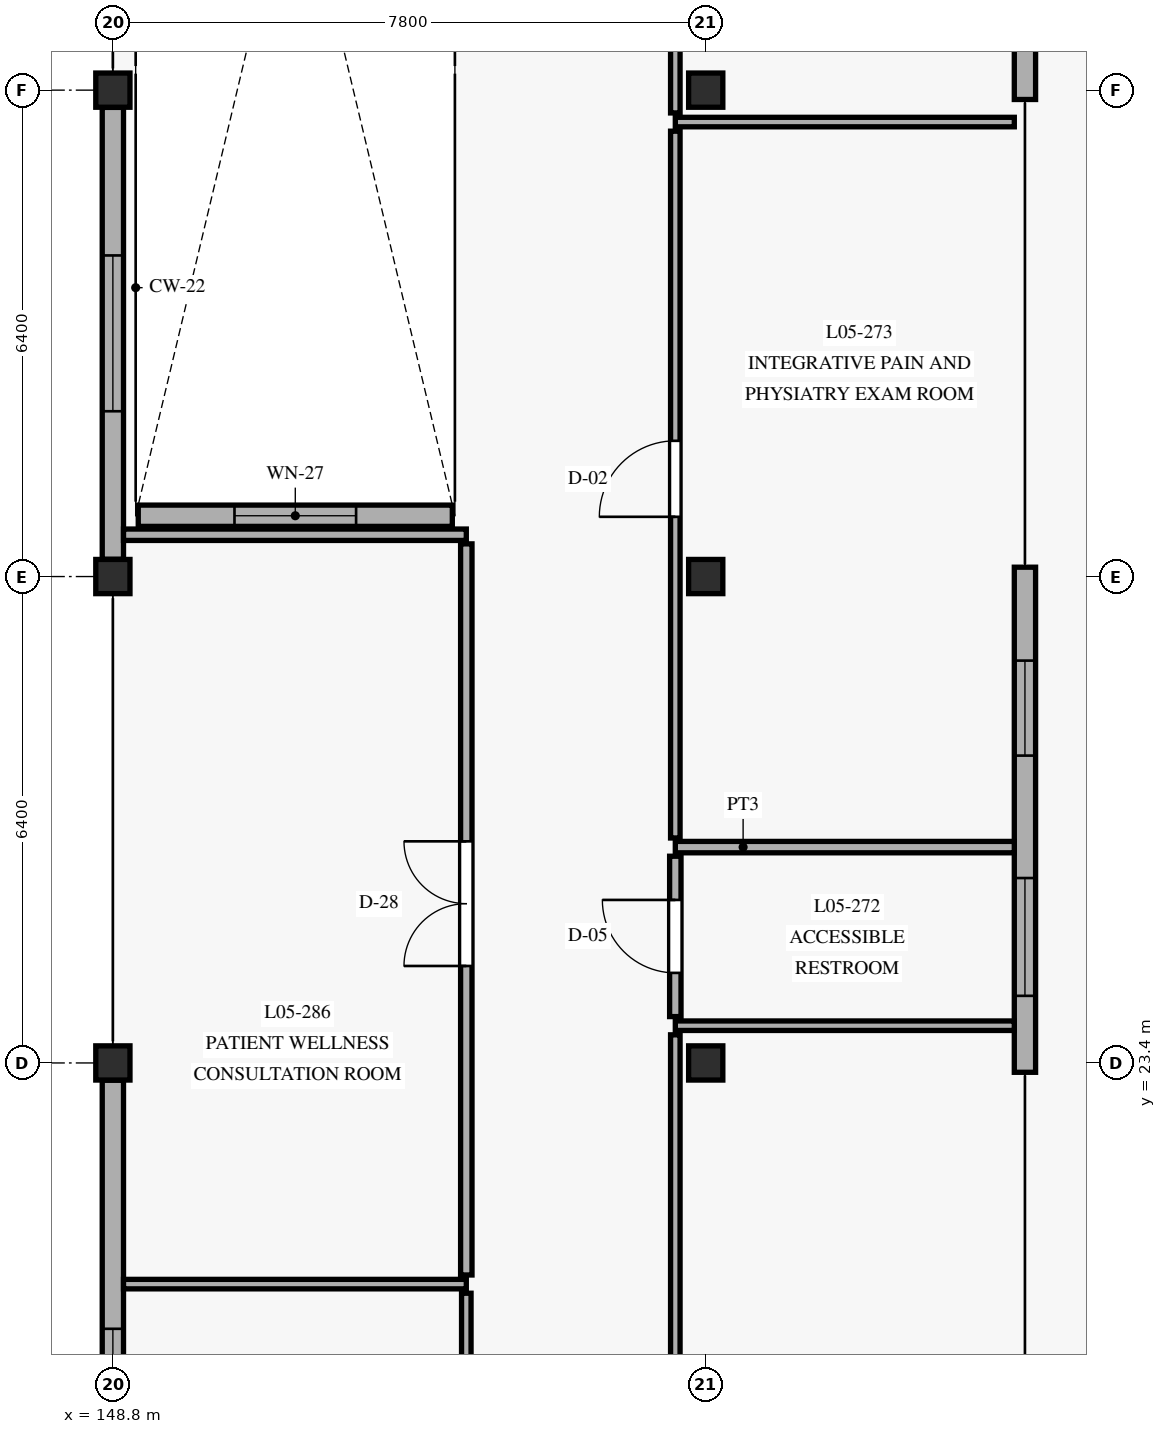
"""IFC4 building model, lengths in metres.
Left out: names, types, materials, properties, quantities, classifications, styles, units other than length and angle.
Written with IfcOpenShell. Run it as: python <this file> out.ifc"""

import sys

from ifc_helpers import new_model, si_unit, direction, frame, frame_2d, origin, origin_with_axes, origin_2d, place, context, subcontext, project, spatial, rectangle, extrude, element, fill, save


model = new_model("IFC4")
c1 = context("Model", 3, precision=1e-05, world=origin(), true_north=direction((0.0, 1.0)))
c2 = subcontext(c1, "Body", "Model", "MODEL_VIEW")
j1 = project(units=[si_unit("LENGTHUNIT", "METRE"), si_unit("PLANEANGLEUNIT", "RADIAN")], contexts=[c1])
p1 = place(None, origin())
s1 = spatial("IfcSite", under=j1, at=p1, CompositionType="ELEMENT")
p2 = place(p1, origin())
s2 = spatial("IfcBuilding", under=s1, at=p2, CompositionType="ELEMENT")
p3 = place(p2, frame((0.0, 0.0, 17.55)))
s3 = spatial("IfcBuildingStorey", under=s2, at=p3, CompositionType="ELEMENT", Elevation=17.55)
for number, where, z_axis, x_axis in (
    (1, (148.8, 23.4, 0.0), (0.0, 0.0, 1.0), (1.0, 0.0, 0.0)),
    (2, (148.8, 29.8, 0.0), (0.0, 0.0, 1.0), (1.0, 0.0, 0.0)),
    (3, (148.8, 36.2, 0.0), (0.0, 0.0, 1.0), (1.0, 0.0, 0.0)),
    (4, (156.6, 23.4, 0.0), (0.0, 0.0, 1.0), (1.0, 0.0, 0.0)),
    (5, (156.6, 29.8, 0.0), (0.0, 0.0, 1.0), (1.0, 0.0, 0.0)),
    (6, (156.6, 36.2, 0.0), (0.0, 0.0, 1.0), (1.0, 0.0, 0.0)),
):
    element("IfcColumn", number, at=place(p3, frame(where, z_axis=z_axis, x_axis=x_axis)), inside=s3, PredefinedType="COLUMN", context=c2, shape_type="SweptSolid", body=[
        extrude(rectangle(XDim=0.45, YDim=0.45, at=origin_2d()), origin(), (0.0, 0.0, 1.0), 4.05),
    ])
p4 = place(p3, frame((160.8, 23.277, 0.0), z_axis=(0.0, 0.0, 1.0), x_axis=(0.0, 1.0, 0.0)))
e7 = element("IfcWall", 7, at=p4, inside=s3, PredefinedType="SOLIDWALL", context=c2, shape_type="SweptSolid", body=[
    extrude(rectangle(XDim=6.646, YDim=0.28, at=frame_2d((3.323, 0.0))), origin(), (0.0, 0.0, 1.0), 3.84),
])
p5 = place(p4, frame((1.006, 0.0, 0.85)))
e8 = element("IfcOpeningElement", 8, at=p5, cuts=e7, PredefinedType="OPENING", context=c2, shape_type="SweptSolid", body=[
    extrude(rectangle(XDim=1.55, YDim=1.75, at=frame_2d((0.775, 0.875))), frame((0.0, 0.15, 0.0), z_axis=(0.0, -1.0, 0.0), x_axis=(1.0, 0.0, 0.0)), (0.0, 0.0, 1.0), 0.3),
])
p6 = place(p4, frame((4.167, 0.0, 0.85)))
e9 = element("IfcOpeningElement", 9, at=p6, cuts=e7, PredefinedType="OPENING", context=c2, shape_type="SweptSolid", body=[
    extrude(rectangle(XDim=1.25, YDim=1.75, at=frame_2d((0.625, 0.875))), frame((0.0, 0.15, 0.0), z_axis=(0.0, -1.0, 0.0), x_axis=(1.0, 0.0, 0.0)), (0.0, 0.0, 1.0), 0.3),
])
p7 = place(p3, frame((160.8, 36.077, 0.0), z_axis=(0.0, 0.0, 1.0), x_axis=(0.0, 1.0, 0.0)))
e10 = element("IfcWall", 10, at=p7, inside=s3, PredefinedType="SOLIDWALL", context=c2, shape_type="SweptSolid", body=[
    extrude(rectangle(XDim=6.646, YDim=0.28, at=frame_2d((3.323, 0.0))), origin(), (0.0, 0.0, 1.0), 3.84),
])
p8 = place(p7, frame((1.44, 0.0, 0.85)))
e11 = element("IfcOpeningElement", 11, at=p8, cuts=e10, PredefinedType="OPENING", context=c2, shape_type="SweptSolid", body=[
    extrude(rectangle(XDim=1.55, YDim=1.75, at=frame_2d((0.775, 0.875))), frame((0.0, 0.15, 0.0), z_axis=(0.0, -1.0, 0.0), x_axis=(1.0, 0.0, 0.0)), (0.0, 0.0, 1.0), 0.3),
])
p9 = place(p7, frame((3.806, 0.0, 0.85)))
e12 = element("IfcOpeningElement", 12, at=p9, cuts=e10, PredefinedType="OPENING", context=c2, shape_type="SweptSolid", body=[
    extrude(rectangle(XDim=1.25, YDim=1.75, at=frame_2d((0.625, 0.875))), frame((0.0, 0.15, 0.0), z_axis=(0.0, -1.0, 0.0), x_axis=(1.0, 0.0, 0.0)), (0.0, 0.0, 1.0), 0.3),
])
p10 = place(p3, frame((148.8, 23.173, 0.0), z_axis=(0.0, 0.0, 1.0), x_axis=(0.0, -1.0, 0.0)))
e13 = element("IfcWall", 13, at=p10, inside=s3, PredefinedType="SOLIDWALL", context=c2, shape_type="SweptSolid", body=[
    extrude(rectangle(XDim=5.946, YDim=0.28, at=frame_2d((2.973, 0.0))), origin(), (0.0, 0.0, 1.0), 3.46),
])
p11 = place(p10, frame((3.271, 0.0, 0.8)))
e14 = element("IfcOpeningElement", 14, at=p11, cuts=e13, PredefinedType="OPENING", context=c2, shape_type="SweptSolid", body=[
    extrude(rectangle(XDim=2.05, YDim=1.95, at=frame_2d((1.025, 0.975))), frame((0.0, 0.15, 0.0), z_axis=(0.0, -1.0, 0.0), x_axis=(1.0, 0.0, 0.0)), (0.0, 0.0, 1.0), 0.3),
])
p12 = place(p3, frame((148.8, 35.973, 0.0), z_axis=(0.0, 0.0, 1.0), x_axis=(0.0, -1.0, 0.0)))
e15 = element("IfcWall", 15, at=p12, inside=s3, PredefinedType="SOLIDWALL", context=c2, shape_type="SweptSolid", body=[
    extrude(rectangle(XDim=5.946, YDim=0.28, at=frame_2d((2.973, 0.0))), origin(), (0.0, 0.0, 1.0), 3.46),
])
p13 = place(p12, frame((1.948, 0.0, 0.8)))
e16 = element("IfcOpeningElement", 16, at=p13, cuts=e15, PredefinedType="OPENING", context=c2, shape_type="SweptSolid", body=[
    extrude(rectangle(XDim=2.05, YDim=1.95, at=frame_2d((1.025, 0.975))), frame((0.0, 0.15, 0.0), z_axis=(0.0, -1.0, 0.0), x_axis=(1.0, 0.0, 0.0)), (0.0, 0.0, 1.0), 0.3),
])
p14 = place(p3, frame((153.266, 30.6, 0.0), z_axis=(0.0, 0.0, 1.0), x_axis=(-1.0, 0.0, 0.0)))
e17 = element("IfcWall", 17, at=p14, inside=s3, PredefinedType="SOLIDWALL", context=c2, shape_type="SweptSolid", body=[
    extrude(rectangle(XDim=4.132, YDim=0.28, at=frame_2d((2.066, 0.0))), origin(), (0.0, 0.0, 1.0), 3.84),
])
p15 = place(p14, frame((1.266, 0.0, 0.85)))
e18 = element("IfcOpeningElement", 18, at=p15, cuts=e17, PredefinedType="OPENING", context=c2, shape_type="SweptSolid", body=[
    extrude(rectangle(XDim=1.6, YDim=1.8, at=frame_2d((0.8, 0.9))), frame((0.0, 0.15, 0.0), z_axis=(0.0, -1.0, 0.0), x_axis=(1.0, 0.0, 0.0)), (0.0, 0.0, 1.0), 0.3),
])
p16 = place(p3, frame((156.2, 13.15, 0.0), z_axis=(0.0, 0.0, 1.0), x_axis=(0.0, 1.0, 0.0)))
e19 = element("IfcWall", 19, at=p16, inside=s3, PredefinedType="PARTITIONING", context=c2, shape_type="SweptSolid", body=[
    extrude(rectangle(XDim=10.62, YDim=0.125, at=frame_2d((5.31, 0.0))), origin(), (0.0, 0.0, 1.0), 3.435),
])
p17 = place(p16, frame((4.935, 0.0, 0.0)))
e20 = element("IfcOpeningElement", 20, at=p17, cuts=e19, PredefinedType="OPENING", context=c2, shape_type="SweptSolid", body=[
    extrude(rectangle(XDim=0.9, YDim=2.12, at=frame_2d((0.45, 1.06))), frame((0.0, 0.073, 0.0), z_axis=(0.0, -1.0, 0.0), x_axis=(1.0, 0.0, 0.0)), (0.0, 0.0, 1.0), 0.145),
])
p18 = place(p3, frame((156.2, 23.89, 0.0), z_axis=(0.0, 0.0, 1.0), x_axis=(1.0, 0.0, 0.0)))
e21 = element("IfcWall", 21, at=p18, inside=s3, PredefinedType="PARTITIONING", context=c2, shape_type="SweptSolid", body=[
    extrude(rectangle(XDim=4.46, YDim=0.125, at=frame_2d((2.23, 0.0))), origin(), (0.0, 0.0, 1.0), 3.455),
])
p19 = place(p3, frame((156.2, 24.01, 0.0), z_axis=(0.0, 0.0, 1.0), x_axis=(0.0, 1.0, 0.0)))
e22 = element("IfcWall", 22, at=p19, inside=s3, PredefinedType="PARTITIONING", context=c2, shape_type="SweptSolid", body=[
    extrude(rectangle(XDim=2.11, YDim=0.15, at=frame_2d((1.055, 0.0))), origin(), (0.0, 0.0, 1.0), 3.835),
])
p20 = place(p19, frame((0.575, 0.0, 0.0)))
e23 = element("IfcOpeningElement", 23, at=p20, cuts=e22, PredefinedType="OPENING", context=c2, shape_type="SweptSolid", body=[
    extrude(rectangle(XDim=0.96, YDim=2.1, at=frame_2d((0.48, 1.05))), frame((0.0, 0.085, 0.0), z_axis=(0.0, -1.0, 0.0), x_axis=(1.0, 0.0, 0.0)), (0.0, 0.0, 1.0), 0.17),
])
p21 = place(p3, frame((156.2, 26.24, 0.0), z_axis=(0.0, 0.0, 1.0), x_axis=(1.0, 0.0, 0.0)))
e24 = element("IfcWall", 24, at=p21, inside=s3, PredefinedType="PARTITIONING", context=c2, shape_type="SweptSolid", body=[
    extrude(rectangle(XDim=4.46, YDim=0.15, at=frame_2d((2.23, 0.0))), origin(), (0.0, 0.0, 1.0), 3.455),
])
p22 = place(p3, frame((156.2, 26.36, 0.0), z_axis=(0.0, 0.0, 1.0), x_axis=(0.0, 1.0, 0.0)))
e25 = element("IfcWall", 25, at=p22, inside=s3, PredefinedType="PARTITIONING", context=c2, shape_type="SweptSolid", body=[
    extrude(rectangle(XDim=9.3, YDim=0.125, at=frame_2d((4.65, 0.0))), origin(), (0.0, 0.0, 1.0), 3.435),
])
p23 = place(p22, frame((4.226, 0.0, 0.0)))
e26 = element("IfcOpeningElement", 26, at=p23, cuts=e25, PredefinedType="OPENING", context=c2, shape_type="SweptSolid", body=[
    extrude(rectangle(XDim=1.0, YDim=2.15, at=frame_2d((0.5, 1.075))), frame((0.0, 0.073, 0.0), z_axis=(0.0, -1.0, 0.0), x_axis=(1.0, 0.0, 0.0)), (0.0, 0.0, 1.0), 0.145),
])
p24 = place(p3, frame((156.2, 35.78, 0.0), z_axis=(0.0, 0.0, 1.0), x_axis=(1.0, 0.0, 0.0)))
e27 = element("IfcWall", 27, at=p24, inside=s3, PredefinedType="PARTITIONING", context=c2, shape_type="SweptSolid", body=[
    extrude(rectangle(XDim=4.46, YDim=0.125, at=frame_2d((2.23, 0.0))), origin(), (0.0, 0.0, 1.0), 3.455),
])
p25 = place(p3, frame((156.2, 35.9, 0.0), z_axis=(0.0, 0.0, 1.0), x_axis=(0.0, 1.0, 0.0)))
e28 = element("IfcWall", 28, at=p25, inside=s3, PredefinedType="PARTITIONING", context=c2, shape_type="SweptSolid", body=[
    extrude(rectangle(XDim=11.13, YDim=0.125, at=frame_2d((5.565, 0.0))), origin(), (0.0, 0.0, 1.0), 3.835),
])
p26 = place(p25, frame((4.963, 0.0, 0.0)))
e29 = element("IfcOpeningElement", 29, at=p26, cuts=e28, PredefinedType="OPENING", context=c2, shape_type="SweptSolid", body=[
    extrude(rectangle(XDim=0.9, YDim=2.12, at=frame_2d((0.45, 1.06))), frame((0.0, 0.073, 0.0), z_axis=(0.0, -1.0, 0.0), x_axis=(1.0, 0.0, 0.0)), (0.0, 0.0, 1.0), 0.145),
])
p27 = place(p3, frame((153.45, 11.66, 0.0), z_axis=(0.0, 0.0, 1.0), x_axis=(0.0, 1.0, 0.0)))
e30 = element("IfcWall", 30, at=p27, inside=s3, PredefinedType="PARTITIONING", context=c2, shape_type="SweptSolid", body=[
    extrude(rectangle(XDim=8.71, YDim=0.125, at=frame_2d((4.355, 0.0))), origin(), (0.0, 0.0, 1.0), 3.435),
])
p28 = place(p27, frame((3.895, 0.0, 0.0)))
e31 = element("IfcOpeningElement", 31, at=p28, cuts=e30, PredefinedType="OPENING", context=c2, shape_type="SweptSolid", body=[
    extrude(rectangle(XDim=0.92, YDim=2.15, at=frame_2d((0.46, 1.075))), frame((0.0, 0.073, 0.0), z_axis=(0.0, -1.0, 0.0), x_axis=(1.0, 0.0, 0.0)), (0.0, 0.0, 1.0), 0.145),
])
p29 = place(p3, frame((148.94, 20.49, 0.0), z_axis=(0.0, 0.0, 1.0), x_axis=(1.0, 0.0, 0.0)))
e32 = element("IfcWall", 32, at=p29, inside=s3, PredefinedType="PARTITIONING", context=c2, shape_type="SweptSolid", body=[
    extrude(rectangle(XDim=4.51, YDim=0.125, at=frame_2d((2.255, 0.0))), origin(), (0.0, 0.0, 1.0), 3.455),
])
p30 = place(p3, frame((153.45, 20.61, 0.0), z_axis=(0.0, 0.0, 1.0), x_axis=(0.0, 1.0, 0.0)))
e33 = element("IfcWall", 33, at=p30, inside=s3, PredefinedType="PARTITIONING", context=c2, shape_type="SweptSolid", body=[
    extrude(rectangle(XDim=9.62, YDim=0.15, at=frame_2d((4.81, 0.0))), origin(), (0.0, 0.0, 1.0), 3.435),
])
p31 = place(p30, frame((4.066, 0.0, 0.0)))
e34 = element("IfcOpeningElement", 34, at=p31, cuts=e33, PredefinedType="OPENING", context=c2, shape_type="SweptSolid", body=[
    extrude(rectangle(XDim=1.64, YDim=2.32, at=frame_2d((0.82, 1.16))), frame((0.0, 0.085, 0.0), z_axis=(0.0, -1.0, 0.0), x_axis=(1.0, 0.0, 0.0)), (0.0, 0.0, 1.0), 0.17),
])
p32 = place(p3, frame((148.94, 30.35, 0.0), z_axis=(0.0, 0.0, 1.0), x_axis=(1.0, 0.0, 0.0)))
e35 = element("IfcWall", 35, at=p32, inside=s3, PredefinedType="PARTITIONING", context=c2, shape_type="SweptSolid", body=[
    extrude(rectangle(XDim=4.51, YDim=0.15, at=frame_2d((2.255, 0.0))), origin(), (0.0, 0.0, 1.0), 3.455),
])
p33 = place(p5, origin_with_axes())
e36 = element("IfcWindow", 36, at=p33, inside=s3, PartitioningType="SINGLE_PANEL", PredefinedType="WINDOW", context=c2, shape_type="SweptSolid", body=[
    extrude(rectangle(XDim=1.55, YDim=1.75, at=frame_2d((0.775, 0.875))), frame((0.0, 0.03, 0.0), z_axis=(0.0, -1.0, 0.0), x_axis=(1.0, 0.0, 0.0)), (0.0, 0.0, 1.0), 0.06),
])
fill(e8, e36)
p34 = place(p6, origin_with_axes())
e37 = element("IfcWindow", 37, at=p34, inside=s3, PartitioningType="SINGLE_PANEL", PredefinedType="WINDOW", context=c2, shape_type="SweptSolid", body=[
    extrude(rectangle(XDim=1.25, YDim=1.75, at=frame_2d((0.625, 0.875))), frame((0.0, 0.03, 0.0), z_axis=(0.0, -1.0, 0.0), x_axis=(1.0, 0.0, 0.0)), (0.0, 0.0, 1.0), 0.06),
])
fill(e9, e37)
p35 = place(p11, origin_with_axes())
e38 = element("IfcWindow", 38, at=p35, inside=s3, PartitioningType="SINGLE_PANEL", PredefinedType="WINDOW", context=c2, shape_type="SweptSolid", body=[
    extrude(rectangle(XDim=2.05, YDim=1.95, at=frame_2d((1.025, 0.975))), frame((0.0, 0.03, 0.0), z_axis=(0.0, -1.0, 0.0), x_axis=(1.0, 0.0, 0.0)), (0.0, 0.0, 1.0), 0.06),
])
fill(e14, e38)
p36 = place(p13, origin_with_axes())
e39 = element("IfcWindow", 39, at=p36, inside=s3, PartitioningType="SINGLE_PANEL", PredefinedType="WINDOW", context=c2, shape_type="SweptSolid", body=[
    extrude(rectangle(XDim=2.05, YDim=1.95, at=frame_2d((1.025, 0.975))), frame((0.0, 0.03, 0.0), z_axis=(0.0, -1.0, 0.0), x_axis=(1.0, 0.0, 0.0)), (0.0, 0.0, 1.0), 0.06),
])
fill(e16, e39)
p37 = place(p15, origin_with_axes())
e40 = element("IfcWindow", 40, at=p37, inside=s3, PartitioningType="SINGLE_PANEL", PredefinedType="WINDOW", context=c2, shape_type="SweptSolid", body=[
    extrude(rectangle(XDim=1.6, YDim=1.8, at=frame_2d((0.8, 0.9))), frame((0.0, 0.03, 0.0), z_axis=(0.0, -1.0, 0.0), x_axis=(1.0, 0.0, 0.0)), (0.0, 0.0, 1.0), 0.06),
])
fill(e18, e40)
p38 = place(p20, frame((0.96, 0.0, 0.0), z_axis=(0.0, 0.0, 1.0), x_axis=(-1.0, 0.0, 0.0)))
e41 = element("IfcDoor", 41, at=p38, inside=s3, OperationType="SINGLE_SWING_LEFT", PredefinedType="DOOR", context=c2, shape_type="SweptSolid", body=[
    extrude(rectangle(XDim=0.96, YDim=2.1, at=frame_2d((0.48, 1.05))), frame((0.0, 0.025, 0.0), z_axis=(0.0, -1.0, 0.0), x_axis=(1.0, 0.0, 0.0)), (0.0, 0.0, 1.0), 0.05),
])
fill(e23, e41)
p39 = place(p23, frame((1.0, 0.0, 0.0), z_axis=(0.0, 0.0, 1.0), x_axis=(-1.0, 0.0, 0.0)))
e42 = element("IfcDoor", 42, at=p39, inside=s3, OperationType="SINGLE_SWING_RIGHT", PredefinedType="DOOR", context=c2, shape_type="SweptSolid", body=[
    extrude(rectangle(XDim=1.0, YDim=2.15, at=frame_2d((0.5, 1.075))), frame((0.0, 0.025, 0.0), z_axis=(0.0, -1.0, 0.0), x_axis=(1.0, 0.0, 0.0)), (0.0, 0.0, 1.0), 0.05),
])
fill(e26, e42)
p40 = place(p31, origin_with_axes())
e43 = element("IfcDoor", 43, at=p40, inside=s3, OperationType="DOUBLE_DOOR_SINGLE_SWING", PredefinedType="DOOR", context=c2, shape_type="SweptSolid", body=[
    extrude(rectangle(XDim=1.64, YDim=2.32, at=frame_2d((0.82, 1.16))), frame((0.0, 0.025, 0.0), z_axis=(0.0, -1.0, 0.0), x_axis=(1.0, 0.0, 0.0)), (0.0, 0.0, 1.0), 0.05),
])
fill(e34, e43)
save(model, sys.argv[1])
